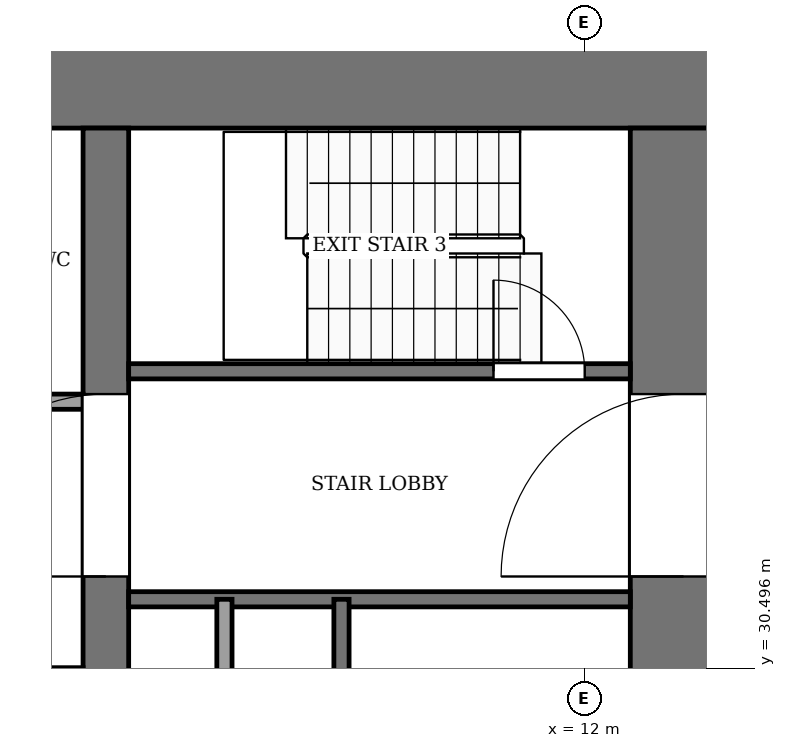
"""IFC4 building model, lengths in metres.
Left out: names, types, materials, properties, quantities, classifications, styles, units other than length and angle.
Written with IfcOpenShell. Run it as: python <this file> out.ifc"""

import sys

from ifc_helpers import new_model, si_unit, direction, frame, frame_2d, origin, place, context, subcontext, project, spatial, rectangle, extrude, element, fill, save


model = new_model("IFC4")
c1 = context("Model", 3, precision=1e-05, world=origin(), true_north=direction((0.0, 1.0)))
c2 = subcontext(c1, "Body", "Model", "MODEL_VIEW")
j1 = project(units=[si_unit("LENGTHUNIT", "METRE"), si_unit("PLANEANGLEUNIT", "RADIAN")], contexts=[c1])
p1 = place(None, origin())
s1 = spatial("IfcSite", under=j1, at=p1, CompositionType="ELEMENT")
p2 = place(p1, origin())
s2 = spatial("IfcBuilding", under=s1, at=p2, CompositionType="ELEMENT")
p3 = place(p2, frame((0.0, 0.0, 30.0)))
s3 = spatial("IfcBuildingStorey", under=s2, at=p3, CompositionType="ELEMENT", Elevation=30.0)
p4 = place(p3, frame((-14.0, 38.3, -0.13), z_axis=(0.0, 0.0, 1.0), x_axis=(1.0, 0.0, 0.0)))
e1 = element("IfcWall", 1, at=p4, inside=s3, PredefinedType="SHEAR", context=c2, shape_type="SweptSolid", body=[
    extrude(rectangle(XDim=28.0, YDim=1.4, at=frame_2d((14.0, 0.0))), origin(), (0.0, 0.0, 1.0), 4.0),
])
p5 = place(p3, frame((13.3, 18.4, -0.13), z_axis=(0.0, 0.0, 1.0), x_axis=(0.0, 1.0, 0.0)))
e2 = element("IfcWall", 2, at=p5, inside=s3, PredefinedType="SHEAR", context=c2, shape_type="SweptSolid", body=[
    extrude(rectangle(XDim=19.2, YDim=1.4, at=frame_2d((9.6, 0.0))), origin(), (0.0, 0.0, 1.0), 4.0),
])
p6 = place(p5, frame((2.8, 0.0, 0.13)))
e3 = element("IfcOpeningElement", 3, at=p6, cuts=e2, PredefinedType="OPENING", context=c2, shape_type="SweptSolid", body=[
    extrude(rectangle(XDim=2.4, YDim=2.4, at=frame_2d((1.2, 1.2))), frame((0.0, 0.71, 0.0), z_axis=(0.0, -1.0, 0.0), x_axis=(1.0, 0.0, 0.0)), (0.0, 0.0, 1.0), 1.42),
])
p7 = place(p5, frame((13.3, 0.0, 0.13)))
e4 = element("IfcOpeningElement", 4, at=p7, cuts=e2, PredefinedType="OPENING", context=c2, shape_type="SweptSolid", body=[
    extrude(rectangle(XDim=2.4, YDim=2.4, at=frame_2d((1.2, 1.2))), frame((0.0, 0.71, 0.0), z_axis=(0.0, -1.0, 0.0), x_axis=(1.0, 0.0, 0.0)), (0.0, 0.0, 1.0), 1.42),
])
p8 = place(p3, frame((5.7, 18.4, -0.13), z_axis=(0.0, 0.0, 1.0), x_axis=(0.0, 1.0, 0.0)))
e5 = element("IfcWall", 5, at=p8, inside=s3, PredefinedType="SHEAR", context=c2, shape_type="SweptSolid", body=[
    extrude(rectangle(XDim=19.2, YDim=0.6, at=frame_2d((9.6, 0.0))), origin(), (0.0, 0.0, 1.0), 4.0),
])
p9 = place(p8, frame((13.3, 0.0, 0.13)))
e6 = element("IfcOpeningElement", 6, at=p9, cuts=e5, PredefinedType="OPENING", context=c2, shape_type="SweptSolid", body=[
    extrude(rectangle(XDim=2.4, YDim=2.4, at=frame_2d((1.2, 1.2))), frame((0.0, 0.31, 0.0), z_axis=(0.0, -1.0, 0.0), x_axis=(1.0, 0.0, 0.0)), (0.0, 0.0, 1.0), 0.62),
])
p10 = place(p3, frame((6.0, 31.4, 0.0), z_axis=(0.0, 0.0, 1.0), x_axis=(1.0, 0.0, 0.0)))
e7 = element("IfcWall", 7, at=p10, inside=s3, PredefinedType="PARTITIONING", context=c2, shape_type="SweptSolid", body=[
    extrude(rectangle(XDim=6.6, YDim=0.2, at=frame_2d((3.3, 0.0))), origin(), (0.0, 0.0, 1.0), 3.87),
])
p11 = place(p3, frame((-5.4, 34.0, 0.0), z_axis=(0.0, 0.0, 1.0), x_axis=(1.0, 0.0, 0.0)))
e8 = element("IfcWall", 8, at=p11, inside=s3, PredefinedType="PARTITIONING", context=c2, shape_type="SweptSolid", body=[
    extrude(rectangle(XDim=10.8, YDim=0.2, at=frame_2d((5.4, 0.0))), origin(), (0.0, 0.0, 1.0), 3.87),
])
p12 = place(p11, frame((6.15, 0.0, 0.0)))
e9 = element("IfcOpeningElement", 9, at=p12, cuts=e8, PredefinedType="OPENING", context=c2, shape_type="SweptSolid", body=[
    extrude(rectangle(XDim=1.2, YDim=2.2, at=frame_2d((0.6, 1.1))), frame((0.0, 0.11, 0.0), z_axis=(0.0, -1.0, 0.0), x_axis=(1.0, 0.0, 0.0)), (0.0, 0.0, 1.0), 0.22),
])
p13 = place(p11, frame((8.95, 0.0, 0.0)))
e10 = element("IfcOpeningElement", 10, at=p13, cuts=e8, PredefinedType="OPENING", context=c2, shape_type="SweptSolid", body=[
    extrude(rectangle(XDim=1.0, YDim=2.1, at=frame_2d((0.5, 1.05))), frame((0.0, 0.11, 0.0), z_axis=(0.0, -1.0, 0.0), x_axis=(1.0, 0.0, 0.0)), (0.0, 0.0, 1.0), 0.22),
])
p14 = place(p3, frame((6.0, 34.4, 0.0), z_axis=(0.0, 0.0, 1.0), x_axis=(1.0, 0.0, 0.0)))
e11 = element("IfcWall", 11, at=p14, inside=s3, PredefinedType="PARTITIONING", context=c2, shape_type="SweptSolid", body=[
    extrude(rectangle(XDim=6.6, YDim=0.2, at=frame_2d((3.3, 0.0))), origin(), (0.0, 0.0, 1.0), 3.87),
])
p15 = place(p14, frame((4.8, 0.0, 0.0)))
e12 = element("IfcOpeningElement", 12, at=p15, cuts=e11, PredefinedType="OPENING", context=c2, shape_type="SweptSolid", body=[
    extrude(rectangle(XDim=1.2, YDim=2.2, at=frame_2d((0.6, 1.1))), frame((0.0, 0.11, 0.0), z_axis=(0.0, -1.0, 0.0), x_axis=(1.0, 0.0, 0.0)), (0.0, 0.0, 1.0), 0.22),
])
for number, where, z_axis, x_axis in (
    (13, (7.26, 24.0, 0.0), (0.0, 0.0, 1.0), (0.0, 1.0, 0.0)),
    (14, (8.8, 24.0, 0.0), (0.0, 0.0, 1.0), (0.0, 1.0, 0.0)),
):
    element("IfcWall", number, at=place(p3, frame(where, z_axis=z_axis, x_axis=x_axis)), inside=s3, PredefinedType="PARTITIONING", context=c2, shape_type="SweptSolid", body=[
        extrude(rectangle(XDim=7.4, YDim=0.2, at=frame_2d((3.7, 0.0))), origin(), (0.0, 0.0, 1.0), 3.87),
    ])
p16 = place(p15, origin())
e15 = element("IfcDoor", 15, at=p16, inside=s3, OperationType="SINGLE_SWING_RIGHT", PredefinedType="DOOR", context=c2, shape_type="SweptSolid", body=[
    extrude(rectangle(XDim=1.2, YDim=2.2, at=frame_2d((0.6, 1.1))), frame((0.0, 0.025, 0.0), z_axis=(0.0, -1.0, 0.0), x_axis=(1.0, 0.0, 0.0)), (0.0, 0.0, 1.0), 0.05),
])
fill(e12, e15)
p17 = place(p9, origin())
e16 = element("IfcDoor", 16, at=p17, inside=s3, OperationType="DOUBLE_DOOR_SINGLE_SWING", PredefinedType="DOOR", context=c2, shape_type="SweptSolid", body=[
    extrude(rectangle(XDim=2.4, YDim=2.4, at=frame_2d((1.2, 1.2))), frame((0.0, 0.025, 0.0), z_axis=(0.0, -1.0, 0.0), x_axis=(1.0, 0.0, 0.0)), (0.0, 0.0, 1.0), 0.05),
])
fill(e6, e16)
p18 = place(p7, origin())
e17 = element("IfcDoor", 17, at=p18, inside=s3, OperationType="DOUBLE_DOOR_SINGLE_SWING", PredefinedType="DOOR", context=c2, shape_type="SweptSolid", body=[
    extrude(rectangle(XDim=2.4, YDim=2.4, at=frame_2d((1.2, 1.2))), frame((0.0, 0.025, 0.0), z_axis=(0.0, -1.0, 0.0), x_axis=(1.0, 0.0, 0.0)), (0.0, 0.0, 1.0), 0.05),
])
fill(e4, e17)
save(model, sys.argv[1])
